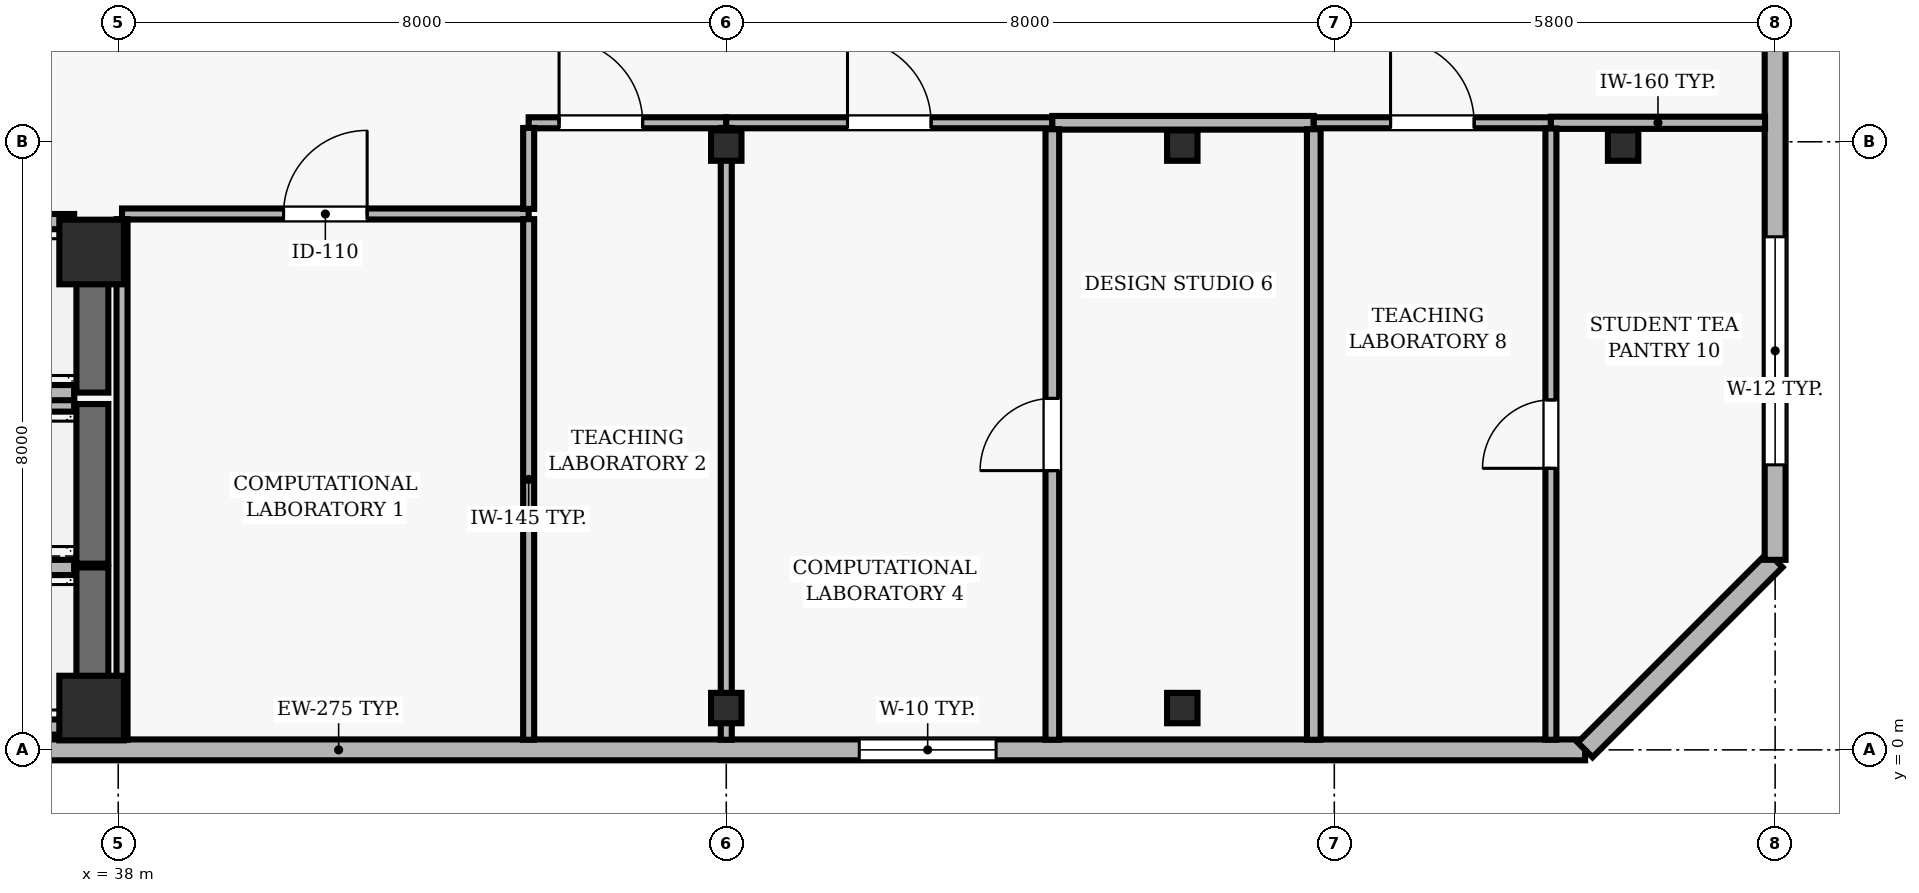
"""IFC4 building model, lengths in metres.
Left out: names, types, materials, properties, quantities, classifications, styles, units other than length and angle.
Written with IfcOpenShell. Run it as: python <this file> out.ifc"""

import sys

from ifc_helpers import new_model, si_unit, direction, frame, frame_2d, origin, origin_2d, place, context, subcontext, project, spatial, rectangle, hollow_rectangle, extrude, element, fill, save


model = new_model("IFC4")
c1 = context("Model", 3, precision=1e-05, world=origin(), true_north=direction((0.0, 1.0)))
c2 = subcontext(c1, "Body", "Model", "MODEL_VIEW")
j1 = project(units=[si_unit("LENGTHUNIT", "METRE"), si_unit("PLANEANGLEUNIT", "RADIAN")], contexts=[c1])
p1 = place(None, origin())
s1 = spatial("IfcSite", under=j1, at=p1, CompositionType="ELEMENT")
p2 = place(p1, origin())
s2 = spatial("IfcBuilding", under=s1, at=p2, CompositionType="ELEMENT")
p3 = place(p2, frame((0.0, 0.0, 283.3)))
s3 = spatial("IfcBuildingStorey", under=s2, at=p3, CompositionType="ELEMENT", Elevation=283.3)
for number, where, z_axis, x_axis in (
    (1, (37.65, 0.55, 0.0), (0.0, 0.0, 1.0), (1.0, 0.0, 0.0)),
    (2, (37.65, 6.55, 0.0), (0.0, 0.0, 1.0), (1.0, 0.0, 0.0)),
):
    element("IfcColumn", number, at=place(p3, frame(where, z_axis=z_axis, x_axis=x_axis)), inside=s3, PredefinedType="COLUMN", context=c2, shape_type="SweptSolid", body=[
        extrude(rectangle(XDim=0.85, YDim=0.85, at=origin_2d()), origin(), (0.0, 0.0, 1.0), 3.9),
    ])
for number, where, z_axis, x_axis in (
    (3, (46.0, 0.55, 0.0), (0.0, 0.0, 1.0), (1.0, 0.0, 0.0)),
    (4, (46.0, 7.95, 0.0), (0.0, 0.0, 1.0), (1.0, 0.0, 0.0)),
    (5, (52.0, 0.55, 0.0), (0.0, 0.0, 1.0), (1.0, 0.0, 0.0)),
    (6, (52.0, 7.95, 0.0), (0.0, 0.0, 1.0), (1.0, 0.0, 0.0)),
    (7, (57.8, 7.95, 0.0), (0.0, 0.0, 1.0), (1.0, 0.0, 0.0)),
):
    element("IfcColumn", number, at=place(p3, frame(where, z_axis=z_axis, x_axis=x_axis)), inside=s3, PredefinedType="COLUMN", context=c2, shape_type="SweptSolid", body=[
        extrude(hollow_rectangle(XDim=0.4, YDim=0.4, WallThickness=0.02, at=origin_2d()), origin(), (0.0, 0.0, 1.0), 3.9),
    ])
p4 = place(p3, frame((24.5, 0.0, 0.0), z_axis=(0.0, 0.0, 1.0), x_axis=(1.0, 0.0, 0.0)))
e8 = element("IfcWall", 8, at=p4, inside=s3, PredefinedType="SOLIDWALL", context=c2, shape_type="SweptSolid", body=[
    extrude(rectangle(XDim=32.8, YDim=0.275, at=frame_2d((16.4, 0.0))), origin(), (0.0, 0.0, 1.0), 3.69),
])
p5 = place(p4, frame((1.833, 0.0, 0.9)))
e9 = element("IfcOpeningElement", 9, at=p5, cuts=e8, PredefinedType="OPENING", context=c2, shape_type="SweptSolid", body=[
    extrude(rectangle(XDim=1.8, YDim=2.2, at=frame_2d((0.9, 1.1))), frame((0.0, 0.147, 0.0), z_axis=(0.0, -1.0, 0.0), x_axis=(1.0, 0.0, 0.0)), (0.0, 0.0, 1.0), 0.295),
])
p6 = place(p4, frame((8.2, 0.0, 0.9)))
e10 = element("IfcOpeningElement", 10, at=p6, cuts=e8, PredefinedType="OPENING", context=c2, shape_type="SweptSolid", body=[
    extrude(rectangle(XDim=1.8, YDim=2.2, at=frame_2d((0.9, 1.1))), frame((0.0, 0.147, 0.0), z_axis=(0.0, -1.0, 0.0), x_axis=(1.0, 0.0, 0.0)), (0.0, 0.0, 1.0), 0.295),
])
p7 = place(p4, frame((23.25, 0.0, 0.9)))
e11 = element("IfcOpeningElement", 11, at=p7, cuts=e8, PredefinedType="OPENING", context=c2, shape_type="SweptSolid", body=[
    extrude(rectangle(XDim=1.8, YDim=2.2, at=frame_2d((0.9, 1.1))), frame((0.0, 0.147, 0.0), z_axis=(0.0, -1.0, 0.0), x_axis=(1.0, 0.0, 0.0)), (0.0, 0.0, 1.0), 0.295),
])
p8 = place(p3, frame((57.3, 0.0, 0.0), z_axis=(0.0, 0.0, 1.0), x_axis=(0.707106781187, 0.707106781187, 0.0)))
e12 = element("IfcWall", 12, at=p8, inside=s3, PredefinedType="SOLIDWALL", context=c2, shape_type="SweptSolid", body=[
    extrude(rectangle(XDim=3.536, YDim=0.275, at=frame_2d((1.768, 0.0))), origin(), (0.0, 0.0, 1.0), 3.69),
])
p9 = place(p3, frame((59.8, 2.5, 0.0), z_axis=(0.0, 0.0, 1.0), x_axis=(0.0, 1.0, 0.0)))
e13 = element("IfcWall", 13, at=p9, inside=s3, PredefinedType="SOLIDWALL", context=c2, shape_type="SweptSolid", body=[
    extrude(rectangle(XDim=11.0, YDim=0.275, at=frame_2d((5.5, 0.0))), origin(), (0.0, 0.0, 1.0), 3.69),
])
p10 = place(p9, frame((1.25, 0.0, 0.9)))
e14 = element("IfcOpeningElement", 14, at=p10, cuts=e13, PredefinedType="OPENING", context=c2, shape_type="SweptSolid", body=[
    extrude(rectangle(XDim=3.0, YDim=2.2, at=frame_2d((1.5, 1.1))), frame((0.0, 0.147, 0.0), z_axis=(0.0, -1.0, 0.0), x_axis=(1.0, 0.0, 0.0)), (0.0, 0.0, 1.0), 0.295),
])
p11 = place(p3, frame((37.66, 0.3, 0.0), z_axis=(0.0, 0.0, 1.0), x_axis=(0.0, 1.0, 0.0)))
e15 = element("IfcWall", 15, at=p11, inside=s3, PredefinedType="SHEAR", context=c2, shape_type="SweptSolid", body=[
    extrude(rectangle(XDim=2.1, YDim=0.42, at=frame_2d((1.05, 0.0))), origin(), (0.0, 0.0, 1.0), 3.69),
])
for number, where, z_axis, x_axis in (
    (16, (35.28, 0.3, 0.0), (0.0, 0.0, 1.0), (1.0, 0.0, 0.0)),
    (17, (37.42, 2.4, 0.0), (0.0, 0.0, 1.0), (-1.0, 0.0, 0.0)),
):
    element("IfcWall", number, at=place(p3, frame(where, z_axis=z_axis, x_axis=x_axis)), inside=s3, PredefinedType="SOLIDWALL", context=c2, shape_type="SweptSolid", body=[
        extrude(rectangle(XDim=2.14, YDim=0.2, at=frame_2d((1.07, 0.0))), origin(), (0.0, 0.0, 1.0), 3.69),
    ])
p12 = place(p3, frame((37.66, 2.45, 0.0), z_axis=(0.0, 0.0, 1.0), x_axis=(0.0, 1.0, 0.0)))
e18 = element("IfcWall", 18, at=p12, inside=s3, PredefinedType="SHEAR", context=c2, shape_type="SweptSolid", body=[
    extrude(rectangle(XDim=2.1, YDim=0.42, at=frame_2d((1.05, 0.0))), origin(), (0.0, 0.0, 1.0), 3.69),
])
p13 = place(p3, frame((37.42, 4.55, 0.0), z_axis=(0.0, 0.0, 1.0), x_axis=(-1.0, 0.0, 0.0)))
e19 = element("IfcWall", 19, at=p13, inside=s3, PredefinedType="SOLIDWALL", context=c2, shape_type="SweptSolid", body=[
    extrude(rectangle(XDim=2.14, YDim=0.2, at=frame_2d((1.07, 0.0))), origin(), (0.0, 0.0, 1.0), 3.69),
])
p14 = place(p3, frame((37.66, 4.7, 0.0), z_axis=(0.0, 0.0, 1.0), x_axis=(0.0, 1.0, 0.0)))
e20 = element("IfcWall", 20, at=p14, inside=s3, PredefinedType="SHEAR", context=c2, shape_type="SweptSolid", body=[
    extrude(rectangle(XDim=2.25, YDim=0.42, at=frame_2d((1.125, 0.0))), origin(), (0.0, 0.0, 1.0), 3.69),
])
for number, where, z_axis, x_axis in (
    (21, (35.28, 4.7, 0.0), (0.0, 0.0, 1.0), (1.0, 0.0, 0.0)),
    (22, (37.42, 6.95, 0.0), (0.0, 0.0, 1.0), (-1.0, 0.0, 0.0)),
):
    element("IfcWall", number, at=place(p3, frame(where, z_axis=z_axis, x_axis=x_axis)), inside=s3, PredefinedType="SOLIDWALL", context=c2, shape_type="SweptSolid", body=[
        extrude(rectangle(XDim=2.14, YDim=0.2, at=frame_2d((1.07, 0.0))), origin(), (0.0, 0.0, 1.0), 3.69),
    ])
p15 = place(p3, frame((38.05, 7.05, 0.0), z_axis=(0.0, 0.0, 1.0), x_axis=(1.0, 0.0, 0.0)))
e23 = element("IfcWall", 23, at=p15, inside=s3, PredefinedType="PARTITIONING", context=c2, shape_type="SweptSolid", body=[
    extrude(rectangle(XDim=5.35, YDim=0.145, at=frame_2d((2.675, 0.0))), origin(), (0.0, 0.0, 1.0), 3.69),
])
p16 = place(p15, frame((2.125, 0.0, 0.0)))
e24 = element("IfcOpeningElement", 24, at=p16, cuts=e23, PredefinedType="OPENING", context=c2, shape_type="SweptSolid", body=[
    extrude(rectangle(XDim=1.1, YDim=2.15, at=frame_2d((0.55, 1.075))), frame((0.0, 0.083, 0.0), z_axis=(0.0, -1.0, 0.0), x_axis=(1.0, 0.0, 0.0)), (0.0, 0.0, 1.0), 0.165),
])
p17 = place(p3, frame((43.4, 8.25, 0.0), z_axis=(0.0, 0.0, 1.0), x_axis=(1.0, 0.0, 0.0)))
e25 = element("IfcWall", 25, at=p17, inside=s3, PredefinedType="PARTITIONING", context=c2, shape_type="SweptSolid", body=[
    extrude(rectangle(XDim=2.6, YDim=0.145, at=frame_2d((1.3, 0.0))), origin(), (0.0, 0.0, 1.0), 3.227),
])
p18 = place(p17, frame((0.4, 0.0, 0.0)))
e26 = element("IfcOpeningElement", 26, at=p18, cuts=e25, PredefinedType="OPENING", context=c2, shape_type="SweptSolid", body=[
    extrude(rectangle(XDim=1.1, YDim=2.15, at=frame_2d((0.55, 1.075))), frame((0.0, 0.083, 0.0), z_axis=(0.0, -1.0, 0.0), x_axis=(1.0, 0.0, 0.0)), (0.0, 0.0, 1.0), 0.165),
])
p19 = place(p3, frame((46.0, 8.25, 0.0), z_axis=(0.0, 0.0, 1.0), x_axis=(1.0, 0.0, 0.0)))
e27 = element("IfcWall", 27, at=p19, inside=s3, PredefinedType="PARTITIONING", context=c2, shape_type="SweptSolid", body=[
    extrude(rectangle(XDim=4.29, YDim=0.145, at=frame_2d((2.145, 0.0))), origin(), (0.0, 0.0, 1.0), 3.227),
])
p20 = place(p19, frame((1.595, 0.0, 0.0)))
e28 = element("IfcOpeningElement", 28, at=p20, cuts=e27, PredefinedType="OPENING", context=c2, shape_type="SweptSolid", body=[
    extrude(rectangle(XDim=1.1, YDim=2.15, at=frame_2d((0.55, 1.075))), frame((0.0, 0.083, 0.0), z_axis=(0.0, -1.0, 0.0), x_axis=(1.0, 0.0, 0.0)), (0.0, 0.0, 1.0), 0.165),
])
p21 = place(p3, frame((50.29, 8.25, 0.0), z_axis=(0.0, 0.0, 1.0), x_axis=(1.0, 0.0, 0.0)))
e29 = element("IfcWall", 29, at=p21, inside=s3, PredefinedType="PARTITIONING", context=c2, shape_type="SweptSolid", body=[
    extrude(rectangle(XDim=3.44, YDim=0.18, at=frame_2d((1.72, 0.0))), origin(), (0.0, 0.0, 1.0), 3.227),
])
p22 = place(p3, frame((53.73, 8.25, 0.0), z_axis=(0.0, 0.0, 1.0), x_axis=(1.0, 0.0, 0.0)))
e30 = element("IfcWall", 30, at=p22, inside=s3, PredefinedType="PARTITIONING", context=c2, shape_type="SweptSolid", body=[
    extrude(rectangle(XDim=3.12, YDim=0.145, at=frame_2d((1.56, 0.0))), origin(), (0.0, 0.0, 1.0), 3.227),
])
p23 = place(p22, frame((1.01, 0.0, 0.0)))
e31 = element("IfcOpeningElement", 31, at=p23, cuts=e30, PredefinedType="OPENING", context=c2, shape_type="SweptSolid", body=[
    extrude(rectangle(XDim=1.1, YDim=2.15, at=frame_2d((0.55, 1.075))), frame((0.0, 0.083, 0.0), z_axis=(0.0, -1.0, 0.0), x_axis=(1.0, 0.0, 0.0)), (0.0, 0.0, 1.0), 0.165),
])
p24 = place(p3, frame((56.85, 8.25, 0.0), z_axis=(0.0, 0.0, 1.0), x_axis=(1.0, 0.0, 0.0)))
e32 = element("IfcWall", 32, at=p24, inside=s3, PredefinedType="PARTITIONING", context=c2, shape_type="SweptSolid", body=[
    extrude(rectangle(XDim=2.817, YDim=0.16, at=frame_2d((1.408, 0.0))), origin(), (0.0, 0.0, 1.0), 3.227),
])
p25 = place(p3, frame((38.05, 6.982, 0.0), z_axis=(0.0, 0.0, 1.0), x_axis=(0.0, -1.0, 0.0)))
e33 = element("IfcWall", 33, at=p25, inside=s3, PredefinedType="PARTITIONING", context=c2, shape_type="SweptSolid", body=[
    extrude(rectangle(XDim=6.849, YDim=0.145, at=frame_2d((3.424, 0.0))), origin(), (0.0, 0.0, 1.0), 3.227),
])
p26 = place(p3, frame((43.4, 0.133, 0.0), z_axis=(0.0, 0.0, 1.0), x_axis=(0.0, 1.0, 0.0)))
e34 = element("IfcWall", 34, at=p26, inside=s3, PredefinedType="PARTITIONING", context=c2, shape_type="SweptSolid", body=[
    extrude(rectangle(XDim=6.849, YDim=0.145, at=frame_2d((3.424, 0.0))), origin(), (0.0, 0.0, 1.0), 3.69),
])
p27 = place(p3, frame((43.4, 7.117, 0.0), z_axis=(0.0, 0.0, 1.0), x_axis=(0.0, 1.0, 0.0)))
e35 = element("IfcWall", 35, at=p27, inside=s3, PredefinedType="PARTITIONING", context=c2, shape_type="SweptSolid", body=[
    extrude(rectangle(XDim=1.065, YDim=0.145, at=frame_2d((0.532, 0.0))), origin(), (0.0, 0.0, 1.0), 3.69),
])
p28 = place(p3, frame((46.0, 0.133, 0.0), z_axis=(0.0, 0.0, 1.0), x_axis=(0.0, 1.0, 0.0)))
e36 = element("IfcWall", 36, at=p28, inside=s3, PredefinedType="PARTITIONING", context=c2, shape_type="SweptSolid", body=[
    extrude(rectangle(XDim=8.049, YDim=0.145, at=frame_2d((4.024, 0.0))), origin(), (0.0, 0.0, 1.0), 3.227),
])
p29 = place(p3, frame((50.29, 0.133, 0.0), z_axis=(0.0, 0.0, 1.0), x_axis=(0.0, 1.0, 0.0)))
e37 = element("IfcWall", 37, at=p29, inside=s3, PredefinedType="PARTITIONING", context=c2, shape_type="SweptSolid", body=[
    extrude(rectangle(XDim=8.032, YDim=0.18, at=frame_2d((4.016, 0.0))), origin(), (0.0, 0.0, 1.0), 3.69),
])
p30 = place(p29, frame((3.541, 0.0, 0.0)))
e38 = element("IfcOpeningElement", 38, at=p30, cuts=e37, PredefinedType="OPENING", context=c2, shape_type="SweptSolid", body=[
    extrude(rectangle(XDim=0.95, YDim=2.1, at=frame_2d((0.475, 1.05))), frame((0.0, 0.1, 0.0), z_axis=(0.0, -1.0, 0.0), x_axis=(1.0, 0.0, 0.0)), (0.0, 0.0, 1.0), 0.2),
])
p31 = place(p3, frame((53.73, 0.133, 0.0), z_axis=(0.0, 0.0, 1.0), x_axis=(0.0, 1.0, 0.0)))
e39 = element("IfcWall", 39, at=p31, inside=s3, PredefinedType="PARTITIONING", context=c2, shape_type="SweptSolid", body=[
    extrude(rectangle(XDim=8.032, YDim=0.18, at=frame_2d((4.016, 0.0))), origin(), (0.0, 0.0, 1.0), 3.69),
])
p32 = place(p3, frame((56.85, 0.133, 0.0), z_axis=(0.0, 0.0, 1.0), x_axis=(0.0, 1.0, 0.0)))
e40 = element("IfcWall", 40, at=p32, inside=s3, PredefinedType="PARTITIONING", context=c2, shape_type="SweptSolid", body=[
    extrude(rectangle(XDim=8.042, YDim=0.145, at=frame_2d((4.021, 0.0))), origin(), (0.0, 0.0, 1.0), 3.69),
])
p33 = place(p32, frame((3.571, 0.0, 0.0)))
e41 = element("IfcOpeningElement", 41, at=p33, cuts=e40, PredefinedType="OPENING", context=c2, shape_type="SweptSolid", body=[
    extrude(rectangle(XDim=0.9, YDim=2.1, at=frame_2d((0.45, 1.05))), frame((0.0, 0.083, 0.0), z_axis=(0.0, -1.0, 0.0), x_axis=(1.0, 0.0, 0.0)), (0.0, 0.0, 1.0), 0.165),
])
p34 = place(p7, origin())
e42 = element("IfcWindow", 42, at=p34, inside=s3, PartitioningType="SINGLE_PANEL", PredefinedType="WINDOW", context=c2, shape_type="SweptSolid", body=[
    extrude(rectangle(XDim=1.8, YDim=2.2, at=frame_2d((0.9, 1.1))), frame((0.0, 0.03, 0.0), z_axis=(0.0, -1.0, 0.0), x_axis=(1.0, 0.0, 0.0)), (0.0, 0.0, 1.0), 0.06),
])
fill(e11, e42)
p35 = place(p10, origin())
e43 = element("IfcWindow", 43, at=p35, inside=s3, PartitioningType="SINGLE_PANEL", PredefinedType="WINDOW", context=c2, shape_type="SweptSolid", body=[
    extrude(rectangle(XDim=3.0, YDim=2.2, at=frame_2d((1.5, 1.1))), frame((0.0, 0.03, 0.0), z_axis=(0.0, -1.0, 0.0), x_axis=(1.0, 0.0, 0.0)), (0.0, 0.0, 1.0), 0.06),
])
fill(e14, e43)
p36 = place(p16, origin())
e44 = element("IfcDoor", 44, at=p36, inside=s3, OperationType="SINGLE_SWING_RIGHT", PredefinedType="DOOR", context=c2, shape_type="SweptSolid", body=[
    extrude(rectangle(XDim=1.1, YDim=2.15, at=frame_2d((0.55, 1.075))), frame((0.0, 0.025, 0.0), z_axis=(0.0, -1.0, 0.0), x_axis=(1.0, 0.0, 0.0)), (0.0, 0.0, 1.0), 0.05),
])
fill(e24, e44)
p37 = place(p18, origin())
e45 = element("IfcDoor", 45, at=p37, inside=s3, OperationType="SINGLE_SWING_LEFT", PredefinedType="DOOR", context=c2, shape_type="SweptSolid", body=[
    extrude(rectangle(XDim=1.1, YDim=2.15, at=frame_2d((0.55, 1.075))), frame((0.0, 0.025, 0.0), z_axis=(0.0, -1.0, 0.0), x_axis=(1.0, 0.0, 0.0)), (0.0, 0.0, 1.0), 0.05),
])
fill(e26, e45)
p38 = place(p20, origin())
e46 = element("IfcDoor", 46, at=p38, inside=s3, OperationType="SINGLE_SWING_LEFT", PredefinedType="DOOR", context=c2, shape_type="SweptSolid", body=[
    extrude(rectangle(XDim=1.1, YDim=2.15, at=frame_2d((0.55, 1.075))), frame((0.0, 0.025, 0.0), z_axis=(0.0, -1.0, 0.0), x_axis=(1.0, 0.0, 0.0)), (0.0, 0.0, 1.0), 0.05),
])
fill(e28, e46)
p39 = place(p30, origin())
e47 = element("IfcDoor", 47, at=p39, inside=s3, OperationType="SINGLE_SWING_LEFT", PredefinedType="DOOR", context=c2, shape_type="SweptSolid", body=[
    extrude(rectangle(XDim=0.95, YDim=2.1, at=frame_2d((0.475, 1.05))), frame((0.0, 0.025, 0.0), z_axis=(0.0, -1.0, 0.0), x_axis=(1.0, 0.0, 0.0)), (0.0, 0.0, 1.0), 0.05),
])
fill(e38, e47)
p40 = place(p23, origin())
e48 = element("IfcDoor", 48, at=p40, inside=s3, OperationType="SINGLE_SWING_LEFT", PredefinedType="DOOR", context=c2, shape_type="SweptSolid", body=[
    extrude(rectangle(XDim=1.1, YDim=2.15, at=frame_2d((0.55, 1.075))), frame((0.0, 0.025, 0.0), z_axis=(0.0, -1.0, 0.0), x_axis=(1.0, 0.0, 0.0)), (0.0, 0.0, 1.0), 0.05),
])
fill(e31, e48)
p41 = place(p33, origin())
e49 = element("IfcDoor", 49, at=p41, inside=s3, OperationType="SINGLE_SWING_LEFT", PredefinedType="DOOR", context=c2, shape_type="SweptSolid", body=[
    extrude(rectangle(XDim=0.9, YDim=2.1, at=frame_2d((0.45, 1.05))), frame((0.0, 0.025, 0.0), z_axis=(0.0, -1.0, 0.0), x_axis=(1.0, 0.0, 0.0)), (0.0, 0.0, 1.0), 0.05),
])
fill(e41, e49)
save(model, sys.argv[1])
